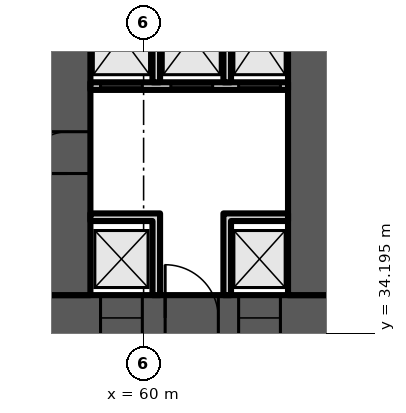
"""IFC4 building model, lengths in metres.
Left out: names, types, materials, properties, quantities, classifications, styles, units other than length and angle.
Written with IfcOpenShell. Run it as: python <this file> out.ifc"""

import sys

from ifc_helpers import new_model, si_unit, direction, frame, frame_2d, origin, place, context, subcontext, project, spatial, polyline, rectangle, outline, extrude, element, fill, save


model = new_model("IFC4")
c1 = context("Model", 3, precision=1e-05, world=origin(), true_north=direction((0.0, 1.0)))
c2 = subcontext(c1, "Body", "Model", "MODEL_VIEW")
j1 = project(units=[si_unit("LENGTHUNIT", "METRE"), si_unit("PLANEANGLEUNIT", "RADIAN")], contexts=[c1])
p1 = place(None, origin())
s1 = spatial("IfcSite", under=j1, at=p1, CompositionType="ELEMENT")
p2 = place(p1, origin())
s2 = spatial("IfcBuilding", under=s1, at=p2, CompositionType="ELEMENT")
p3 = place(p2, frame((0.0, 0.0, 66.7)))
s3 = spatial("IfcBuildingStorey", under=s2, at=p3, CompositionType="ELEMENT", Elevation=66.7)
p4 = place(p3, frame((9.0, 34.6, 0.0), z_axis=(0.0, 0.0, 1.0), x_axis=(1.0, 0.0, 0.0)))
e1 = element("IfcWall", 1, at=p4, inside=s3, PredefinedType="SHEAR", context=c2, shape_type="SweptSolid", body=[
    extrude(rectangle(XDim=56.0, YDim=1.2, at=frame_2d((28.0, 0.0))), origin(), (0.0, 0.0, 1.0), 3.6),
])
p5 = place(p4, frame((2.0, 0.0, 0.0)))
e2 = element("IfcOpeningElement", 2, at=p5, cuts=e1, PredefinedType="OPENING", context=c2, shape_type="SweptSolid", body=[
    extrude(rectangle(XDim=1.0, YDim=2.1, at=frame_2d((0.5, 1.05))), frame((0.0, 0.61, 0.0), z_axis=(0.0, -1.0, 0.0), x_axis=(1.0, 0.0, 0.0)), (0.0, 0.0, 1.0), 1.22),
])
p6 = place(p4, frame((4.6, 0.0, 0.0)))
e3 = element("IfcOpeningElement", 3, at=p6, cuts=e1, PredefinedType="OPENING", context=c2, shape_type="SweptSolid", body=[
    extrude(rectangle(XDim=1.0, YDim=2.1, at=frame_2d((0.5, 1.05))), frame((0.0, 0.61, 0.0), z_axis=(0.0, -1.0, 0.0), x_axis=(1.0, 0.0, 0.0)), (0.0, 0.0, 1.0), 1.22),
])
p7 = place(p4, frame((7.867, 0.0, 0.0)))
e4 = element("IfcOpeningElement", 4, at=p7, cuts=e1, PredefinedType="OPENING", context=c2, shape_type="SweptSolid", body=[
    extrude(rectangle(XDim=1.1, YDim=2.1, at=frame_2d((0.55, 1.05))), frame((0.0, 0.61, 0.0), z_axis=(0.0, -1.0, 0.0), x_axis=(1.0, 0.0, 0.0)), (0.0, 0.0, 1.0), 1.22),
])
p8 = place(p4, frame((12.033, 0.0, 0.0)))
e5 = element("IfcOpeningElement", 5, at=p8, cuts=e1, PredefinedType="OPENING", context=c2, shape_type="SweptSolid", body=[
    extrude(rectangle(XDim=1.1, YDim=2.1, at=frame_2d((0.55, 1.05))), frame((0.0, 0.61, 0.0), z_axis=(0.0, -1.0, 0.0), x_axis=(1.0, 0.0, 0.0)), (0.0, 0.0, 1.0), 1.22),
])
p9 = place(p4, frame((9.8, 0.0, 0.0)))
e6 = element("IfcOpeningElement", 6, at=p9, cuts=e1, PredefinedType="OPENING", context=c2, shape_type="SweptSolid", body=[
    extrude(rectangle(XDim=1.4, YDim=2.1, at=frame_2d((0.7, 1.05))), frame((0.0, 0.61, 0.0), z_axis=(0.0, -1.0, 0.0), x_axis=(1.0, 0.0, 0.0)), (0.0, 0.0, 1.0), 1.22),
])
p10 = place(p4, frame((14.65, 0.0, 0.0)))
e7 = element("IfcOpeningElement", 7, at=p10, cuts=e1, PredefinedType="OPENING", context=c2, shape_type="SweptSolid", body=[
    extrude(rectangle(XDim=1.2, YDim=2.1, at=frame_2d((0.6, 1.05))), frame((0.0, 0.61, 0.0), z_axis=(0.0, -1.0, 0.0), x_axis=(1.0, 0.0, 0.0)), (0.0, 0.0, 1.0), 1.22),
])
p11 = place(p4, frame((21.867, 0.0, 0.0)))
e8 = element("IfcOpeningElement", 8, at=p11, cuts=e1, PredefinedType="OPENING", context=c2, shape_type="SweptSolid", body=[
    extrude(rectangle(XDim=1.1, YDim=2.1, at=frame_2d((0.55, 1.05))), frame((0.0, 0.61, 0.0), z_axis=(0.0, -1.0, 0.0), x_axis=(1.0, 0.0, 0.0)), (0.0, 0.0, 1.0), 1.22),
])
p12 = place(p4, frame((26.033, 0.0, 0.0)))
e9 = element("IfcOpeningElement", 9, at=p12, cuts=e1, PredefinedType="OPENING", context=c2, shape_type="SweptSolid", body=[
    extrude(rectangle(XDim=1.1, YDim=2.1, at=frame_2d((0.55, 1.05))), frame((0.0, 0.61, 0.0), z_axis=(0.0, -1.0, 0.0), x_axis=(1.0, 0.0, 0.0)), (0.0, 0.0, 1.0), 1.22),
])
p13 = place(p4, frame((23.8, 0.0, 0.0)))
e10 = element("IfcOpeningElement", 10, at=p13, cuts=e1, PredefinedType="OPENING", context=c2, shape_type="SweptSolid", body=[
    extrude(rectangle(XDim=1.4, YDim=2.1, at=frame_2d((0.7, 1.05))), frame((0.0, 0.61, 0.0), z_axis=(0.0, -1.0, 0.0), x_axis=(1.0, 0.0, 0.0)), (0.0, 0.0, 1.0), 1.22),
])
p14 = place(p4, frame((28.867, 0.0, 0.0)))
e11 = element("IfcOpeningElement", 11, at=p14, cuts=e1, PredefinedType="OPENING", context=c2, shape_type="SweptSolid", body=[
    extrude(rectangle(XDim=1.1, YDim=2.1, at=frame_2d((0.55, 1.05))), frame((0.0, 0.61, 0.0), z_axis=(0.0, -1.0, 0.0), x_axis=(1.0, 0.0, 0.0)), (0.0, 0.0, 1.0), 1.22),
])
p15 = place(p4, frame((33.033, 0.0, 0.0)))
e12 = element("IfcOpeningElement", 12, at=p15, cuts=e1, PredefinedType="OPENING", context=c2, shape_type="SweptSolid", body=[
    extrude(rectangle(XDim=1.1, YDim=2.1, at=frame_2d((0.55, 1.05))), frame((0.0, 0.61, 0.0), z_axis=(0.0, -1.0, 0.0), x_axis=(1.0, 0.0, 0.0)), (0.0, 0.0, 1.0), 1.22),
])
p16 = place(p4, frame((40.15, 0.0, 0.0)))
e13 = element("IfcOpeningElement", 13, at=p16, cuts=e1, PredefinedType="OPENING", context=c2, shape_type="SweptSolid", body=[
    extrude(rectangle(XDim=1.2, YDim=2.1, at=frame_2d((0.6, 1.05))), frame((0.0, 0.61, 0.0), z_axis=(0.0, -1.0, 0.0), x_axis=(1.0, 0.0, 0.0)), (0.0, 0.0, 1.0), 1.22),
])
p17 = place(p4, frame((44.8, 0.0, 0.0)))
e14 = element("IfcOpeningElement", 14, at=p17, cuts=e1, PredefinedType="OPENING", context=c2, shape_type="SweptSolid", body=[
    extrude(rectangle(XDim=1.4, YDim=2.1, at=frame_2d((0.7, 1.05))), frame((0.0, 0.61, 0.0), z_axis=(0.0, -1.0, 0.0), x_axis=(1.0, 0.0, 0.0)), (0.0, 0.0, 1.0), 1.22),
])
p18 = place(p4, frame((49.867, 0.0, 0.0)))
e15 = element("IfcOpeningElement", 15, at=p18, cuts=e1, PredefinedType="OPENING", context=c2, shape_type="SweptSolid", body=[
    extrude(rectangle(XDim=1.1, YDim=2.1, at=frame_2d((0.55, 1.05))), frame((0.0, 0.61, 0.0), z_axis=(0.0, -1.0, 0.0), x_axis=(1.0, 0.0, 0.0)), (0.0, 0.0, 1.0), 1.22),
])
p19 = place(p4, frame((53.5, 0.0, 0.0)))
e16 = element("IfcOpeningElement", 16, at=p19, cuts=e1, PredefinedType="OPENING", context=c2, shape_type="SweptSolid", body=[
    extrude(rectangle(XDim=1.1, YDim=2.1, at=frame_2d((0.55, 1.05))), frame((0.0, 0.61, 0.0), z_axis=(0.0, -1.0, 0.0), x_axis=(1.0, 0.0, 0.0)), (0.0, 0.0, 1.0), 1.22),
])
p20 = place(p4, frame((51.567, 0.0, 0.0)))
e17 = element("IfcOpeningElement", 17, at=p20, cuts=e1, PredefinedType="OPENING", context=c2, shape_type="SweptSolid", body=[
    extrude(rectangle(XDim=1.4, YDim=2.1, at=frame_2d((0.7, 1.05))), frame((0.0, 0.61, 0.0), z_axis=(0.0, -1.0, 0.0), x_axis=(1.0, 0.0, 0.0)), (0.0, 0.0, 1.0), 1.22),
])
p21 = place(p3, frame((58.0, 35.2, 0.0), z_axis=(0.0, 0.0, 1.0), x_axis=(0.0, 1.0, 0.0)))
e18 = element("IfcWall", 18, at=p21, inside=s3, PredefinedType="SHEAR", context=c2, shape_type="SweptSolid", body=[
    extrude(rectangle(XDim=12.943, YDim=1.2, at=frame_2d((6.471, 0.0))), origin(), (0.0, 0.0, 1.0), 3.6),
])
p22 = place(p21, frame((10.134, 0.0, 0.0)))
e19 = element("IfcOpeningElement", 19, at=p22, cuts=e18, PredefinedType="OPENING", context=c2, shape_type="SweptSolid", body=[
    extrude(rectangle(XDim=1.0, YDim=2.1, at=frame_2d((0.5, 1.05))), frame((0.0, 0.61, 0.0), z_axis=(0.0, -1.0, 0.0), x_axis=(1.0, 0.0, 0.0)), (0.0, 0.0, 1.0), 1.22),
])
p23 = place(p21, frame((3.2, 0.0, 0.0)))
e20 = element("IfcOpeningElement", 20, at=p23, cuts=e18, PredefinedType="OPENING", context=c2, shape_type="SweptSolid", body=[
    extrude(rectangle(XDim=1.1, YDim=2.1, at=frame_2d((0.55, 1.05))), frame((0.0, 0.61, 0.0), z_axis=(0.0, -1.0, 0.0), x_axis=(1.0, 0.0, 0.0)), (0.0, 0.0, 1.0), 1.22),
])
p24 = place(p3, frame((64.4, 35.2, 0.0), z_axis=(0.0, 0.0, 1.0), x_axis=(0.0, 1.0, 0.0)))
e21 = element("IfcWall", 21, at=p24, inside=s3, PredefinedType="SHEAR", context=c2, shape_type="SweptSolid", body=[
    extrude(rectangle(XDim=12.383, YDim=1.2, at=frame_2d((6.191, 0.0))), origin(), (0.0, 0.0, 1.0), 3.6),
])
p25 = place(p3, frame((58.6, 40.7, 0.0), z_axis=(0.0, 0.0, 1.0), x_axis=(1.0, 0.0, 0.0)))
e22 = element("IfcWall", 22, at=p25, inside=s3, PredefinedType="PARTITIONING", context=c2, shape_type="SweptSolid", body=[
    extrude(rectangle(XDim=5.2, YDim=0.2, at=frame_2d((2.6, 0.0))), origin(), (0.0, 0.0, 1.0), 3.2),
])
p26 = place(p25, frame((0.267, 0.0, 0.0)))
e23 = element("IfcOpeningElement", 23, at=p26, cuts=e22, PredefinedType="OPENING", context=c2, shape_type="SweptSolid", body=[
    extrude(rectangle(XDim=1.1, YDim=2.1, at=frame_2d((0.55, 1.05))), frame((0.0, 0.11, 0.0), z_axis=(0.0, -1.0, 0.0), x_axis=(1.0, 0.0, 0.0)), (0.0, 0.0, 1.0), 0.22),
])
p27 = place(p25, frame((2.117, 0.0, 0.0)))
e24 = element("IfcOpeningElement", 24, at=p27, cuts=e22, PredefinedType="OPENING", context=c2, shape_type="SweptSolid", body=[
    extrude(rectangle(XDim=1.1, YDim=2.1, at=frame_2d((0.55, 1.05))), frame((0.0, 0.11, 0.0), z_axis=(0.0, -1.0, 0.0), x_axis=(1.0, 0.0, 0.0)), (0.0, 0.0, 1.0), 0.22),
])
p28 = place(p25, frame((3.9, 0.0, 0.0)))
e25 = element("IfcOpeningElement", 25, at=p28, cuts=e22, PredefinedType="OPENING", context=c2, shape_type="SweptSolid", body=[
    extrude(rectangle(XDim=1.1, YDim=2.1, at=frame_2d((0.55, 1.05))), frame((0.0, 0.11, 0.0), z_axis=(0.0, -1.0, 0.0), x_axis=(1.0, 0.0, 0.0)), (0.0, 0.0, 1.0), 0.22),
])
p29 = place(p3, frame((0.0, 0.0, -0.0)))
e26 = element("IfcWall", 26, at=p29, inside=s3, PredefinedType="PARTITIONING", context=c2, shape_type="SweptSolid", body=[
    extrude(outline(polyline([(60.233, 37.15), (58.6, 37.15), (58.6, 37.35), (60.233, 37.35), (60.433, 37.35), (60.433, 35.2), (60.233, 35.2), (60.233, 37.15)])), origin(), (0.0, 0.0, 1.0), 3.2),
])
p30 = place(p3, frame((0.0, 0.0, -0.0)))
e27 = element("IfcWall", 27, at=p30, inside=s3, PredefinedType="PARTITIONING", context=c2, shape_type="SweptSolid", body=[
    extrude(outline(polyline([(62.1, 37.35), (62.3, 37.35), (63.8, 37.35), (63.8, 37.15), (62.3, 37.15), (62.3, 35.2), (62.1, 35.2), (62.1, 37.35)])), origin(), (0.0, 0.0, 1.0), 3.2),
])
p31 = place(p3, frame((0.0, 0.0, -0.0)))
e28 = element("IfcWall", 28, at=p31, inside=s3, PredefinedType="PARTITIONING", context=c2, shape_type="SweptSolid", body=[
    extrude(outline(polyline([(60.433, 40.8), (60.233, 40.8), (60.233, 43.8), (58.6, 43.8), (58.6, 44.0), (63.8, 44.0), (63.8, 43.8), (62.3, 43.8), (62.3, 40.8), (62.1, 40.8), (62.1, 43.8), (60.433, 43.8), (60.433, 40.8)])), origin(), (0.0, 0.0, 1.0), 3.2),
])
p32 = place(p18, origin())
e29 = element("IfcDoor", 29, at=p32, inside=s3, OperationType="DOUBLE_DOOR_SLIDING", PredefinedType="DOOR", context=c2, shape_type="SweptSolid", body=[
    extrude(rectangle(XDim=1.1, YDim=2.1, at=frame_2d((0.55, 1.05))), frame((0.0, 0.025, 0.0), z_axis=(0.0, -1.0, 0.0), x_axis=(1.0, 0.0, 0.0)), (0.0, 0.0, 1.0), 0.05),
])
fill(e15, e29)
p33 = place(p19, origin())
e30 = element("IfcDoor", 30, at=p33, inside=s3, OperationType="DOUBLE_DOOR_SLIDING", PredefinedType="DOOR", context=c2, shape_type="SweptSolid", body=[
    extrude(rectangle(XDim=1.1, YDim=2.1, at=frame_2d((0.55, 1.05))), frame((0.0, 0.025, 0.0), z_axis=(0.0, -1.0, 0.0), x_axis=(1.0, 0.0, 0.0)), (0.0, 0.0, 1.0), 0.05),
])
fill(e16, e30)
p34 = place(p20, origin())
e31 = element("IfcDoor", 31, at=p34, inside=s3, OperationType="DOUBLE_DOOR_SINGLE_SWING", PredefinedType="DOOR", context=c2, shape_type="SweptSolid", body=[
    extrude(rectangle(XDim=1.4, YDim=2.1, at=frame_2d((0.7, 1.05))), frame((0.0, 0.025, 0.0), z_axis=(0.0, -1.0, 0.0), x_axis=(1.0, 0.0, 0.0)), (0.0, 0.0, 1.0), 0.05),
])
fill(e17, e31)
p35 = place(p26, origin())
e32 = element("IfcDoor", 32, at=p35, inside=s3, OperationType="DOUBLE_DOOR_SLIDING", PredefinedType="DOOR", context=c2, shape_type="SweptSolid", body=[
    extrude(rectangle(XDim=1.1, YDim=2.1, at=frame_2d((0.55, 1.05))), frame((0.0, 0.025, 0.0), z_axis=(0.0, -1.0, 0.0), x_axis=(1.0, 0.0, 0.0)), (0.0, 0.0, 1.0), 0.05),
])
fill(e23, e32)
p36 = place(p27, origin())
e33 = element("IfcDoor", 33, at=p36, inside=s3, OperationType="DOUBLE_DOOR_SLIDING", PredefinedType="DOOR", context=c2, shape_type="SweptSolid", body=[
    extrude(rectangle(XDim=1.1, YDim=2.1, at=frame_2d((0.55, 1.05))), frame((0.0, 0.025, 0.0), z_axis=(0.0, -1.0, 0.0), x_axis=(1.0, 0.0, 0.0)), (0.0, 0.0, 1.0), 0.05),
])
fill(e24, e33)
p37 = place(p28, origin())
e34 = element("IfcDoor", 34, at=p37, inside=s3, OperationType="DOUBLE_DOOR_SLIDING", PredefinedType="DOOR", context=c2, shape_type="SweptSolid", body=[
    extrude(rectangle(XDim=1.1, YDim=2.1, at=frame_2d((0.55, 1.05))), frame((0.0, 0.025, 0.0), z_axis=(0.0, -1.0, 0.0), x_axis=(1.0, 0.0, 0.0)), (0.0, 0.0, 1.0), 0.05),
])
fill(e25, e34)
p38 = place(p23, origin())
e35 = element("IfcDoor", 35, at=p38, inside=s3, OperationType="SINGLE_SWING_LEFT", PredefinedType="DOOR", context=c2, shape_type="SweptSolid", body=[
    extrude(rectangle(XDim=1.1, YDim=2.1, at=frame_2d((0.55, 1.05))), frame((0.0, 0.025, 0.0), z_axis=(0.0, -1.0, 0.0), x_axis=(1.0, 0.0, 0.0)), (0.0, 0.0, 1.0), 0.05),
])
fill(e20, e35)
save(model, sys.argv[1])
